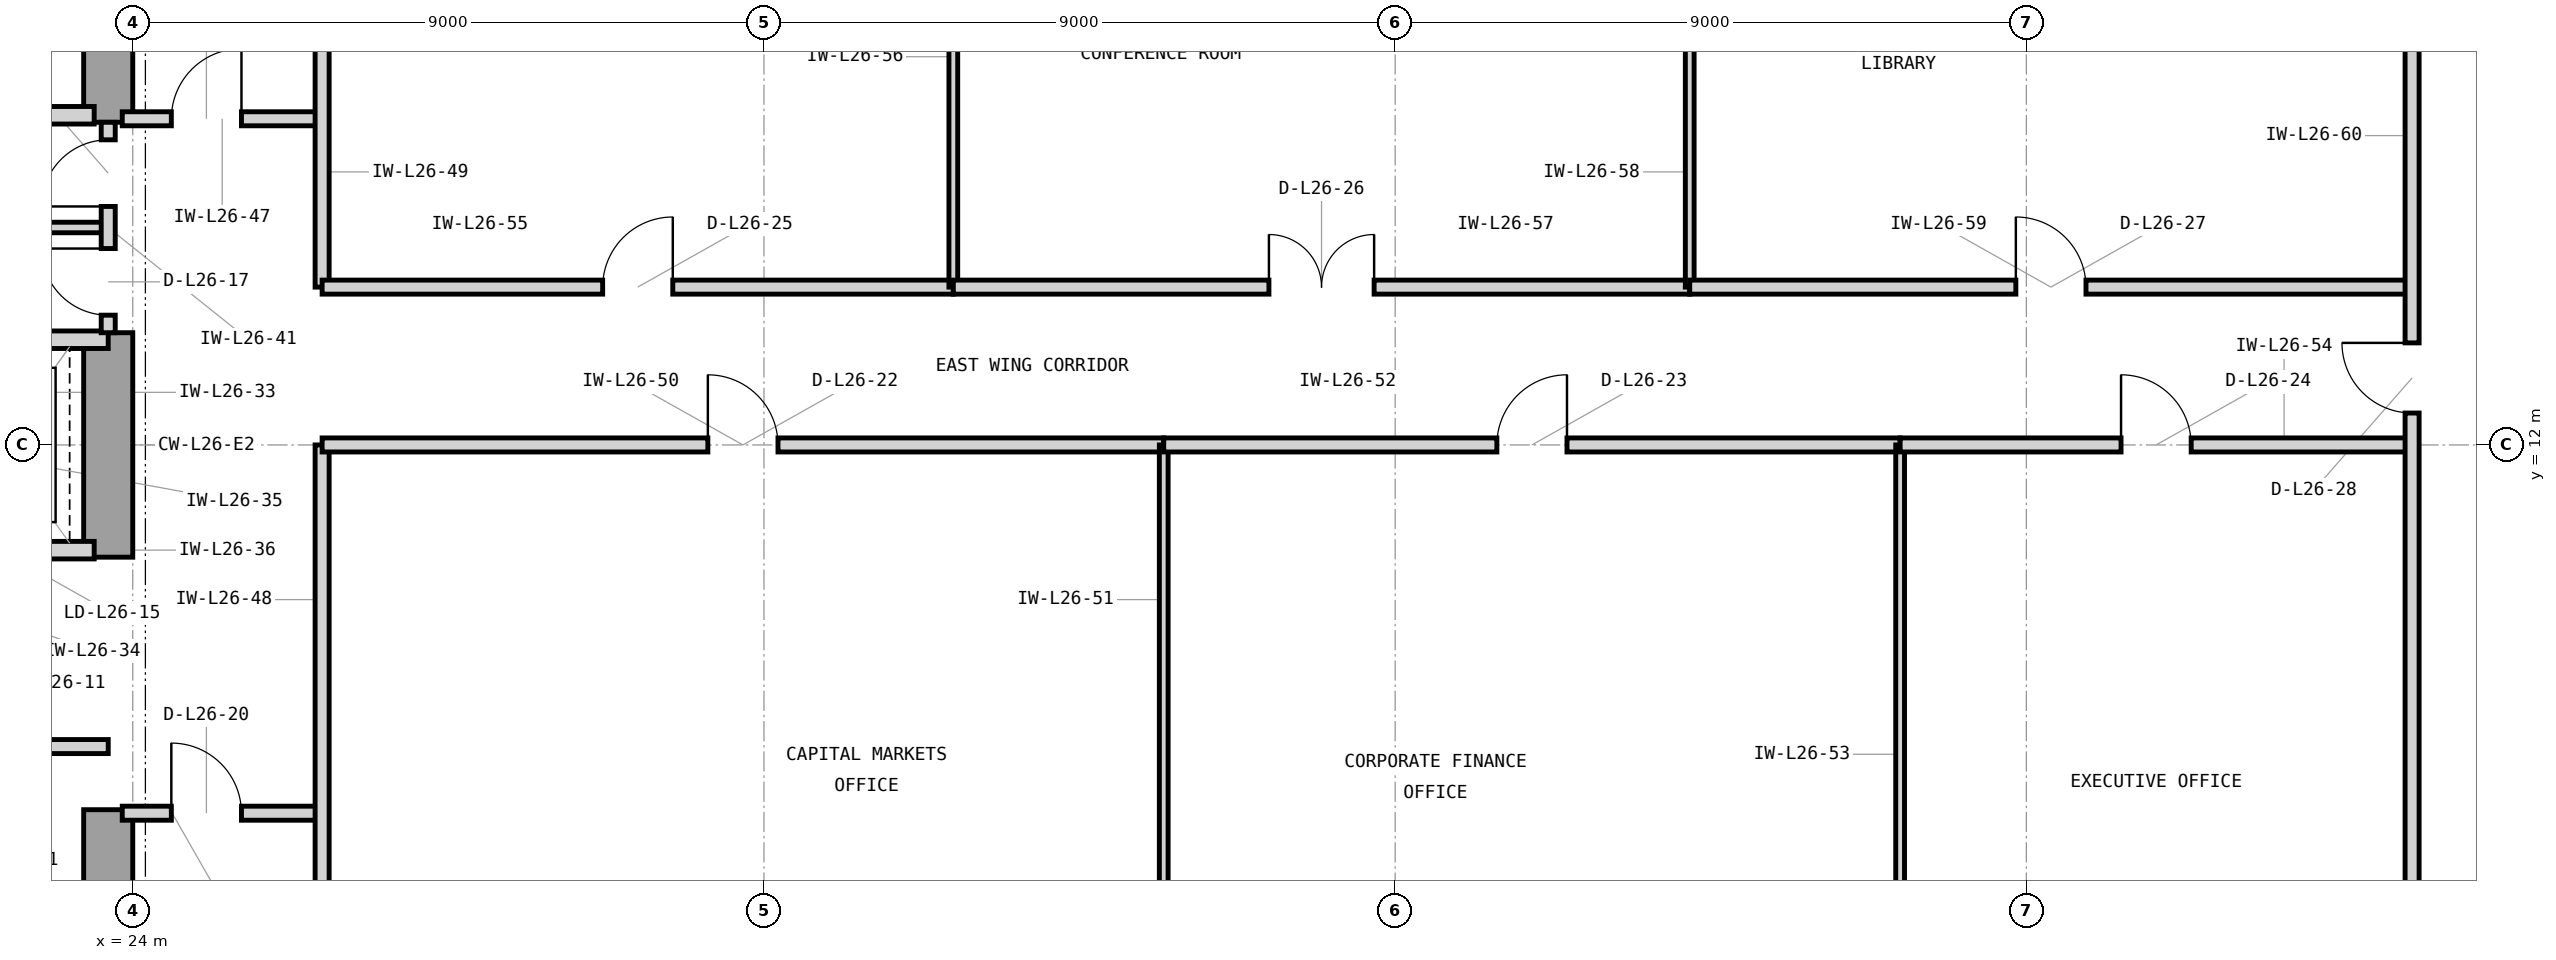
"""IFC4 building model, lengths in metres.
Left out: names, types, materials, properties, quantities, classifications, styles, units other than length and angle.
Written with IfcOpenShell. Run it as: python <this file> out.ifc"""

import sys

from ifc_helpers import new_model, si_unit, direction, frame, frame_2d, origin, place, context, subcontext, project, spatial, rectangle, extrude, element, fill, save


model = new_model("IFC4")
c1 = context("Model", 3, precision=1e-05, world=origin(), true_north=direction((0.0, 1.0)))
c2 = subcontext(c1, "Body", "Model", "MODEL_VIEW")
j1 = project(units=[si_unit("LENGTHUNIT", "METRE"), si_unit("PLANEANGLEUNIT", "RADIAN")], contexts=[c1])
p1 = place(None, origin())
s1 = spatial("IfcSite", under=j1, at=p1, CompositionType="ELEMENT")
p2 = place(p1, origin())
s2 = spatial("IfcBuilding", under=s1, at=p2, CompositionType="ELEMENT")
p3 = place(p2, frame((0.0, 0.0, 112.8)))
s3 = spatial("IfcBuildingStorey", under=s2, at=p3, CompositionType="ELEMENT", Elevation=112.8)
p4 = place(p3, frame((23.65, 3.7, 0.0), z_axis=(0.0, 0.0, 1.0), x_axis=(0.0, 1.0, 0.0)))
e1 = element("IfcWall", 1, at=p4, inside=s3, PredefinedType="SHEAR", context=c2, shape_type="SweptSolid", body=[
    extrude(rectangle(XDim=3.1, YDim=0.7, at=frame_2d((1.55, 0.0))), origin(), (0.0, 0.0, 1.0), 3.9),
])
p5 = place(p3, frame((23.65, 10.4, 0.0), z_axis=(0.0, 0.0, 1.0), x_axis=(0.0, 1.0, 0.0)))
e2 = element("IfcWall", 2, at=p5, inside=s3, PredefinedType="SHEAR", context=c2, shape_type="SweptSolid", body=[
    extrude(rectangle(XDim=3.2, YDim=0.7, at=frame_2d((1.6, 0.0))), origin(), (0.0, 0.0, 1.0), 3.9),
])
p6 = place(p3, frame((23.65, 16.6, 0.0), z_axis=(0.0, 0.0, 1.0), x_axis=(0.0, 1.0, 0.0)))
e3 = element("IfcWall", 3, at=p6, inside=s3, PredefinedType="SHEAR", context=c2, shape_type="SweptSolid", body=[
    extrude(rectangle(XDim=4.05, YDim=0.7, at=frame_2d((2.025, 0.0))), origin(), (0.0, 0.0, 1.0), 3.9),
])
p7 = place(p3, frame((21.05, 16.7, 0.0), z_axis=(0.0, 0.0, 1.0), x_axis=(1.0, 0.0, 0.0)))
e4 = element("IfcWall", 4, at=p7, inside=s3, PredefinedType="PARTITIONING", context=c2, shape_type="SweptSolid", body=[
    extrude(rectangle(XDim=2.4, YDim=0.25, at=frame_2d((1.2, 0.0))), origin(), (0.0, 0.0, 1.0), 3.227),
])
p8 = place(p3, frame((19.15, 7.7, 0.0), z_axis=(0.0, 0.0, 1.0), x_axis=(1.0, 0.0, 0.0)))
e5 = element("IfcWall", 5, at=p8, inside=s3, PredefinedType="PARTITIONING", context=c2, shape_type="SweptSolid", body=[
    extrude(rectangle(XDim=4.5, YDim=0.2, at=frame_2d((2.25, 0.0))), origin(), (0.0, 0.0, 1.0), 3.69),
])
p9 = place(p8, frame((1.75, 0.0, 0.0)))
e6 = element("IfcOpeningElement", 6, at=p9, cuts=e5, PredefinedType="OPENING", context=c2, shape_type="SweptSolid", body=[
    extrude(rectangle(XDim=1.0, YDim=2.15, at=frame_2d((0.5, 1.075))), frame((0.0, 0.11, 0.0), z_axis=(0.0, -1.0, 0.0), x_axis=(1.0, 0.0, 0.0)), (0.0, 0.0, 1.0), 0.22),
])
p10 = place(p3, frame((21.05, 10.5, 0.0), z_axis=(0.0, 0.0, 1.0), x_axis=(1.0, 0.0, 0.0)))
e7 = element("IfcWall", 7, at=p10, inside=s3, PredefinedType="PARTITIONING", context=c2, shape_type="SweptSolid", body=[
    extrude(rectangle(XDim=2.4, YDim=0.25, at=frame_2d((1.2, 0.0))), origin(), (0.0, 0.0, 1.0), 3.227),
])
p11 = place(p10, frame((0.48, 0.0, 0.0)))
e8 = element("IfcOpeningElement", 8, at=p11, cuts=e7, PredefinedType="OPENING", context=c2, shape_type="SweptSolid", body=[
    extrude(rectangle(XDim=1.15, YDim=2.25, at=frame_2d((0.575, 1.125))), frame((0.0, 0.135, 0.0), z_axis=(0.0, -1.0, 0.0), x_axis=(1.0, 0.0, 0.0)), (0.0, 0.0, 1.0), 0.27),
])
p12 = place(p3, frame((14.7, 13.5, 0.0), z_axis=(0.0, 0.0, 1.0), x_axis=(1.0, 0.0, 0.0)))
e9 = element("IfcWall", 9, at=p12, inside=s3, PredefinedType="PARTITIONING", context=c2, shape_type="SweptSolid", body=[
    extrude(rectangle(XDim=8.95, YDim=0.25, at=frame_2d((4.475, 0.0))), origin(), (0.0, 0.0, 1.0), 3.227),
])
p13 = place(p3, frame((19.65, 15.1, 0.0), z_axis=(0.0, 0.0, 1.0), x_axis=(1.0, 0.0, 0.0)))
e10 = element("IfcWall", 10, at=p13, inside=s3, PredefinedType="PARTITIONING", context=c2, shape_type="SweptSolid", body=[
    extrude(rectangle(XDim=4.0, YDim=0.15, at=frame_2d((2.0, 0.0))), origin(), (0.0, 0.0, 1.0), 3.69),
])
p14 = place(p3, frame((23.65, 13.6, 0.0), z_axis=(0.0, 0.0, 1.0), x_axis=(0.0, 1.0, 0.0)))
e11 = element("IfcWall", 11, at=p14, inside=s3, PredefinedType="PARTITIONING", context=c2, shape_type="SweptSolid", body=[
    extrude(rectangle(XDim=3.0, YDim=0.2, at=frame_2d((1.5, 0.0))), origin(), (0.0, 0.0, 1.0), 3.69),
])
p15 = place(p14, frame((0.25, 0.0, 0.0)))
e12 = element("IfcOpeningElement", 12, at=p15, cuts=e11, PredefinedType="OPENING", context=c2, shape_type="SweptSolid", body=[
    extrude(rectangle(XDim=0.95, YDim=2.1, at=frame_2d((0.475, 1.05))), frame((0.0, 0.11, 0.0), z_axis=(0.0, -1.0, 0.0), x_axis=(1.0, 0.0, 0.0)), (0.0, 0.0, 1.0), 0.22),
])
p16 = place(p14, frame((1.8, 0.0, 0.0)))
e13 = element("IfcOpeningElement", 13, at=p16, cuts=e11, PredefinedType="OPENING", context=c2, shape_type="SweptSolid", body=[
    extrude(rectangle(XDim=0.95, YDim=2.1, at=frame_2d((0.475, 1.05))), frame((0.0, 0.11, 0.0), z_axis=(0.0, -1.0, 0.0), x_axis=(1.0, 0.0, 0.0)), (0.0, 0.0, 1.0), 0.22),
])
p17 = place(p3, frame((23.85, 6.75, 0.0), z_axis=(0.0, 0.0, 1.0), x_axis=(1.0, 0.0, 0.0)))
e14 = element("IfcWall", 14, at=p17, inside=s3, PredefinedType="PARTITIONING", context=c2, shape_type="SweptSolid", body=[
    extrude(rectangle(XDim=2.85, YDim=0.2, at=frame_2d((1.425, 0.0))), origin(), (0.0, 0.0, 1.0), 3.69),
])
p18 = place(p17, frame((0.7, 0.0, 0.0)))
e15 = element("IfcOpeningElement", 15, at=p18, cuts=e14, PredefinedType="OPENING", context=c2, shape_type="SweptSolid", body=[
    extrude(rectangle(XDim=1.0, YDim=2.15, at=frame_2d((0.5, 1.075))), frame((0.0, 0.11, 0.0), z_axis=(0.0, -1.0, 0.0), x_axis=(1.0, 0.0, 0.0)), (0.0, 0.0, 1.0), 0.22),
])
p19 = place(p3, frame((23.85, 16.65, 0.0), z_axis=(0.0, 0.0, 1.0), x_axis=(1.0, 0.0, 0.0)))
e16 = element("IfcWall", 16, at=p19, inside=s3, PredefinedType="PARTITIONING", context=c2, shape_type="SweptSolid", body=[
    extrude(rectangle(XDim=2.85, YDim=0.2, at=frame_2d((1.425, 0.0))), origin(), (0.0, 0.0, 1.0), 3.69),
])
p20 = place(p19, frame((0.7, 0.0, 0.0)))
e17 = element("IfcOpeningElement", 17, at=p20, cuts=e16, PredefinedType="OPENING", context=c2, shape_type="SweptSolid", body=[
    extrude(rectangle(XDim=1.0, YDim=2.15, at=frame_2d((0.5, 1.075))), frame((0.0, 0.11, 0.0), z_axis=(0.0, -1.0, 0.0), x_axis=(1.0, 0.0, 0.0)), (0.0, 0.0, 1.0), 0.22),
])
p21 = place(p3, frame((26.7, 3.18, 0.0), z_axis=(0.0, 0.0, 1.0), x_axis=(0.0, 1.0, 0.0)))
e18 = element("IfcWall", 18, at=p21, inside=s3, PredefinedType="PARTITIONING", context=c2, shape_type="SweptSolid", body=[
    extrude(rectangle(XDim=8.82, YDim=0.2, at=frame_2d((4.41, 0.0))), origin(), (0.0, 0.0, 1.0), 3.69),
])
p22 = place(p3, frame((26.7, 14.25, 0.0), z_axis=(0.0, 0.0, 1.0), x_axis=(0.0, 1.0, 0.0)))
e19 = element("IfcWall", 19, at=p22, inside=s3, PredefinedType="PARTITIONING", context=c2, shape_type="SweptSolid", body=[
    extrude(rectangle(XDim=6.57, YDim=0.2, at=frame_2d((3.285, 0.0))), origin(), (0.0, 0.0, 1.0), 3.69),
])
p23 = place(p3, frame((26.7, 12.0, 0.0), z_axis=(0.0, 0.0, 1.0), x_axis=(1.0, 0.0, 0.0)))
e20 = element("IfcWall", 20, at=p23, inside=s3, PredefinedType="PARTITIONING", context=c2, shape_type="SweptSolid", body=[
    extrude(rectangle(XDim=12.0, YDim=0.2, at=frame_2d((6.0, 0.0))), origin(), (0.0, 0.0, 1.0), 3.227),
])
p24 = place(p23, frame((5.5, 0.0, 0.0)))
e21 = element("IfcOpeningElement", 21, at=p24, cuts=e20, PredefinedType="OPENING", context=c2, shape_type="SweptSolid", body=[
    extrude(rectangle(XDim=1.0, YDim=2.15, at=frame_2d((0.5, 1.075))), frame((0.0, 0.11, 0.0), z_axis=(0.0, -1.0, 0.0), x_axis=(1.0, 0.0, 0.0)), (0.0, 0.0, 1.0), 0.22),
])
p25 = place(p3, frame((38.7, 3.18, 0.0), z_axis=(0.0, 0.0, 1.0), x_axis=(0.0, 1.0, 0.0)))
e22 = element("IfcWall", 22, at=p25, inside=s3, PredefinedType="PARTITIONING", context=c2, shape_type="SweptSolid", body=[
    extrude(rectangle(XDim=8.82, YDim=0.125, at=frame_2d((4.41, 0.0))), origin(), (0.0, 0.0, 1.0), 3.69),
])
p26 = place(p3, frame((38.7, 12.0, 0.0), z_axis=(0.0, 0.0, 1.0), x_axis=(1.0, 0.0, 0.0)))
e23 = element("IfcWall", 23, at=p26, inside=s3, PredefinedType="PARTITIONING", context=c2, shape_type="SweptSolid", body=[
    extrude(rectangle(XDim=10.5, YDim=0.2, at=frame_2d((5.25, 0.0))), origin(), (0.0, 0.0, 1.0), 3.227),
])
p27 = place(p26, frame((4.75, 0.0, 0.0)))
e24 = element("IfcOpeningElement", 24, at=p27, cuts=e23, PredefinedType="OPENING", context=c2, shape_type="SweptSolid", body=[
    extrude(rectangle(XDim=1.0, YDim=2.15, at=frame_2d((0.5, 1.075))), frame((0.0, 0.11, 0.0), z_axis=(0.0, -1.0, 0.0), x_axis=(1.0, 0.0, 0.0)), (0.0, 0.0, 1.0), 0.22),
])
p28 = place(p3, frame((49.2, 3.18, 0.0), z_axis=(0.0, 0.0, 1.0), x_axis=(0.0, 1.0, 0.0)))
e25 = element("IfcWall", 25, at=p28, inside=s3, PredefinedType="PARTITIONING", context=c2, shape_type="SweptSolid", body=[
    extrude(rectangle(XDim=8.82, YDim=0.125, at=frame_2d((4.41, 0.0))), origin(), (0.0, 0.0, 1.0), 3.69),
])
p29 = place(p3, frame((49.2, 12.0, 0.0), z_axis=(0.0, 0.0, 1.0), x_axis=(1.0, 0.0, 0.0)))
e26 = element("IfcWall", 26, at=p29, inside=s3, PredefinedType="PARTITIONING", context=c2, shape_type="SweptSolid", body=[
    extrude(rectangle(XDim=7.3, YDim=0.2, at=frame_2d((3.65, 0.0))), origin(), (0.0, 0.0, 1.0), 3.227),
])
p30 = place(p29, frame((3.15, 0.0, 0.0)))
e27 = element("IfcOpeningElement", 27, at=p30, cuts=e26, PredefinedType="OPENING", context=c2, shape_type="SweptSolid", body=[
    extrude(rectangle(XDim=1.0, YDim=2.15, at=frame_2d((0.5, 1.075))), frame((0.0, 0.11, 0.0), z_axis=(0.0, -1.0, 0.0), x_axis=(1.0, 0.0, 0.0)), (0.0, 0.0, 1.0), 0.22),
])
p31 = place(p3, frame((26.7, 14.25, 0.0), z_axis=(0.0, 0.0, 1.0), x_axis=(1.0, 0.0, 0.0)))
e28 = element("IfcWall", 28, at=p31, inside=s3, PredefinedType="PARTITIONING", context=c2, shape_type="SweptSolid", body=[
    extrude(rectangle(XDim=9.0, YDim=0.2, at=frame_2d((4.5, 0.0))), origin(), (0.0, 0.0, 1.0), 3.69),
])
p32 = place(p31, frame((4.0, 0.0, 0.0)))
e29 = element("IfcOpeningElement", 29, at=p32, cuts=e28, PredefinedType="OPENING", context=c2, shape_type="SweptSolid", body=[
    extrude(rectangle(XDim=1.0, YDim=2.15, at=frame_2d((0.5, 1.075))), frame((0.0, 0.11, 0.0), z_axis=(0.0, -1.0, 0.0), x_axis=(1.0, 0.0, 0.0)), (0.0, 0.0, 1.0), 0.22),
])
p33 = place(p3, frame((35.7, 14.25, 0.0), z_axis=(0.0, 0.0, 1.0), x_axis=(0.0, 1.0, 0.0)))
e30 = element("IfcWall", 30, at=p33, inside=s3, PredefinedType="PARTITIONING", context=c2, shape_type="SweptSolid", body=[
    extrude(rectangle(XDim=6.57, YDim=0.125, at=frame_2d((3.285, 0.0))), origin(), (0.0, 0.0, 1.0), 3.69),
])
p34 = place(p3, frame((35.7, 14.25, 0.0), z_axis=(0.0, 0.0, 1.0), x_axis=(1.0, 0.0, 0.0)))
e31 = element("IfcWall", 31, at=p34, inside=s3, PredefinedType="PARTITIONING", context=c2, shape_type="SweptSolid", body=[
    extrude(rectangle(XDim=10.5, YDim=0.2, at=frame_2d((5.25, 0.0))), origin(), (0.0, 0.0, 1.0), 3.69),
])
p35 = place(p34, frame((4.5, 0.0, 0.0)))
e32 = element("IfcOpeningElement", 32, at=p35, cuts=e31, PredefinedType="OPENING", context=c2, shape_type="SweptSolid", body=[
    extrude(rectangle(XDim=1.5, YDim=2.3, at=frame_2d((0.75, 1.15))), frame((0.0, 0.11, 0.0), z_axis=(0.0, -1.0, 0.0), x_axis=(1.0, 0.0, 0.0)), (0.0, 0.0, 1.0), 0.22),
])
p36 = place(p3, frame((46.2, 14.25, 0.0), z_axis=(0.0, 0.0, 1.0), x_axis=(0.0, 1.0, 0.0)))
e33 = element("IfcWall", 33, at=p36, inside=s3, PredefinedType="PARTITIONING", context=c2, shape_type="SweptSolid", body=[
    extrude(rectangle(XDim=6.57, YDim=0.125, at=frame_2d((3.285, 0.0))), origin(), (0.0, 0.0, 1.0), 3.69),
])
p37 = place(p3, frame((46.2, 14.25, 0.0), z_axis=(0.0, 0.0, 1.0), x_axis=(1.0, 0.0, 0.0)))
e34 = element("IfcWall", 34, at=p37, inside=s3, PredefinedType="PARTITIONING", context=c2, shape_type="SweptSolid", body=[
    extrude(rectangle(XDim=10.3, YDim=0.2, at=frame_2d((5.15, 0.0))), origin(), (0.0, 0.0, 1.0), 3.69),
])
p38 = place(p37, frame((4.65, 0.0, 0.0)))
e35 = element("IfcOpeningElement", 35, at=p38, cuts=e34, PredefinedType="OPENING", context=c2, shape_type="SweptSolid", body=[
    extrude(rectangle(XDim=1.0, YDim=2.15, at=frame_2d((0.5, 1.075))), frame((0.0, 0.11, 0.0), z_axis=(0.0, -1.0, 0.0), x_axis=(1.0, 0.0, 0.0)), (0.0, 0.0, 1.0), 0.22),
])
p39 = place(p3, frame((56.5, 3.18, 0.0), z_axis=(0.0, 0.0, 1.0), x_axis=(0.0, 1.0, 0.0)))
e36 = element("IfcWall", 36, at=p39, inside=s3, PredefinedType="PARTITIONING", context=c2, shape_type="SweptSolid", body=[
    extrude(rectangle(XDim=17.64, YDim=0.2, at=frame_2d((8.82, 0.0))), origin(), (0.0, 0.0, 1.0), 3.69),
])
p40 = place(p39, frame((9.275, 0.0, 0.0)))
e37 = element("IfcOpeningElement", 37, at=p40, cuts=e36, PredefinedType="OPENING", context=c2, shape_type="SweptSolid", body=[
    extrude(rectangle(XDim=1.0, YDim=2.15, at=frame_2d((0.5, 1.075))), frame((0.0, 0.11, 0.0), z_axis=(0.0, -1.0, 0.0), x_axis=(1.0, 0.0, 0.0)), (0.0, 0.0, 1.0), 0.22),
])
p41 = place(p15, origin())
e38 = element("IfcDoor", 38, at=p41, inside=s3, OperationType="SINGLE_SWING_RIGHT", PredefinedType="DOOR", context=c2, shape_type="SweptSolid", body=[
    extrude(rectangle(XDim=0.95, YDim=2.1, at=frame_2d((0.475, 1.05))), frame((0.0, 0.025, 0.0), z_axis=(0.0, -1.0, 0.0), x_axis=(1.0, 0.0, 0.0)), (0.0, 0.0, 1.0), 0.05),
])
fill(e12, e38)
p42 = place(p16, origin())
e39 = element("IfcDoor", 39, at=p42, inside=s3, OperationType="SINGLE_SWING_LEFT", PredefinedType="DOOR", context=c2, shape_type="SweptSolid", body=[
    extrude(rectangle(XDim=0.95, YDim=2.1, at=frame_2d((0.475, 1.05))), frame((0.0, 0.025, 0.0), z_axis=(0.0, -1.0, 0.0), x_axis=(1.0, 0.0, 0.0)), (0.0, 0.0, 1.0), 0.05),
])
fill(e13, e39)
p43 = place(p18, origin())
e40 = element("IfcDoor", 40, at=p43, inside=s3, OperationType="SINGLE_SWING_LEFT", PredefinedType="DOOR", context=c2, shape_type="SweptSolid", body=[
    extrude(rectangle(XDim=1.0, YDim=2.15, at=frame_2d((0.5, 1.075))), frame((0.0, 0.025, 0.0), z_axis=(0.0, -1.0, 0.0), x_axis=(1.0, 0.0, 0.0)), (0.0, 0.0, 1.0), 0.05),
])
fill(e15, e40)
p44 = place(p20, origin())
e41 = element("IfcDoor", 41, at=p44, inside=s3, OperationType="SINGLE_SWING_RIGHT", PredefinedType="DOOR", context=c2, shape_type="SweptSolid", body=[
    extrude(rectangle(XDim=1.0, YDim=2.15, at=frame_2d((0.5, 1.075))), frame((0.0, 0.025, 0.0), z_axis=(0.0, -1.0, 0.0), x_axis=(1.0, 0.0, 0.0)), (0.0, 0.0, 1.0), 0.05),
])
fill(e17, e41)
p45 = place(p24, origin())
e42 = element("IfcDoor", 42, at=p45, inside=s3, OperationType="SINGLE_SWING_LEFT", PredefinedType="DOOR", context=c2, shape_type="SweptSolid", body=[
    extrude(rectangle(XDim=1.0, YDim=2.15, at=frame_2d((0.5, 1.075))), frame((0.0, 0.025, 0.0), z_axis=(0.0, -1.0, 0.0), x_axis=(1.0, 0.0, 0.0)), (0.0, 0.0, 1.0), 0.05),
])
fill(e21, e42)
p46 = place(p27, origin())
e43 = element("IfcDoor", 43, at=p46, inside=s3, OperationType="SINGLE_SWING_RIGHT", PredefinedType="DOOR", context=c2, shape_type="SweptSolid", body=[
    extrude(rectangle(XDim=1.0, YDim=2.15, at=frame_2d((0.5, 1.075))), frame((0.0, 0.025, 0.0), z_axis=(0.0, -1.0, 0.0), x_axis=(1.0, 0.0, 0.0)), (0.0, 0.0, 1.0), 0.05),
])
fill(e24, e43)
p47 = place(p30, origin())
e44 = element("IfcDoor", 44, at=p47, inside=s3, OperationType="SINGLE_SWING_LEFT", PredefinedType="DOOR", context=c2, shape_type="SweptSolid", body=[
    extrude(rectangle(XDim=1.0, YDim=2.15, at=frame_2d((0.5, 1.075))), frame((0.0, 0.025, 0.0), z_axis=(0.0, -1.0, 0.0), x_axis=(1.0, 0.0, 0.0)), (0.0, 0.0, 1.0), 0.05),
])
fill(e27, e44)
p48 = place(p32, origin())
e45 = element("IfcDoor", 45, at=p48, inside=s3, OperationType="SINGLE_SWING_RIGHT", PredefinedType="DOOR", context=c2, shape_type="SweptSolid", body=[
    extrude(rectangle(XDim=1.0, YDim=2.15, at=frame_2d((0.5, 1.075))), frame((0.0, 0.025, 0.0), z_axis=(0.0, -1.0, 0.0), x_axis=(1.0, 0.0, 0.0)), (0.0, 0.0, 1.0), 0.05),
])
fill(e29, e45)
p49 = place(p35, origin())
e46 = element("IfcDoor", 46, at=p49, inside=s3, OperationType="DOUBLE_DOOR_SINGLE_SWING", PredefinedType="DOOR", context=c2, shape_type="SweptSolid", body=[
    extrude(rectangle(XDim=1.5, YDim=2.3, at=frame_2d((0.75, 1.15))), frame((0.0, 0.025, 0.0), z_axis=(0.0, -1.0, 0.0), x_axis=(1.0, 0.0, 0.0)), (0.0, 0.0, 1.0), 0.05),
])
fill(e32, e46)
p50 = place(p38, origin())
e47 = element("IfcDoor", 47, at=p50, inside=s3, OperationType="SINGLE_SWING_LEFT", PredefinedType="DOOR", context=c2, shape_type="SweptSolid", body=[
    extrude(rectangle(XDim=1.0, YDim=2.15, at=frame_2d((0.5, 1.075))), frame((0.0, 0.025, 0.0), z_axis=(0.0, -1.0, 0.0), x_axis=(1.0, 0.0, 0.0)), (0.0, 0.0, 1.0), 0.05),
])
fill(e35, e47)
p51 = place(p40, origin())
e48 = element("IfcDoor", 48, at=p51, inside=s3, OperationType="SINGLE_SWING_RIGHT", PredefinedType="DOOR", context=c2, shape_type="SweptSolid", body=[
    extrude(rectangle(XDim=1.0, YDim=2.15, at=frame_2d((0.5, 1.075))), frame((0.0, 0.025, 0.0), z_axis=(0.0, -1.0, 0.0), x_axis=(1.0, 0.0, 0.0)), (0.0, 0.0, 1.0), 0.05),
])
fill(e37, e48)
save(model, sys.argv[1])
